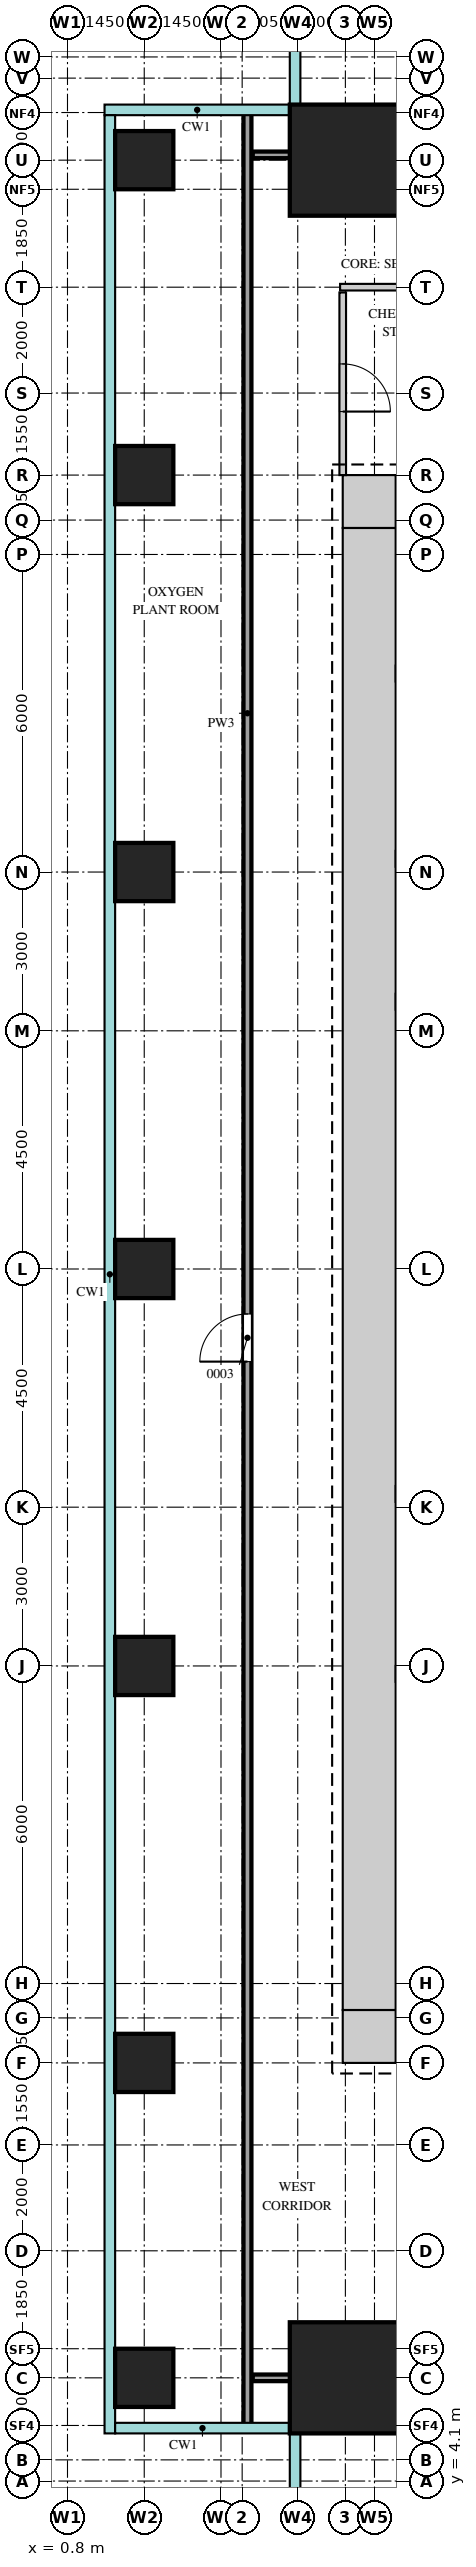
"""IFC4 building model, lengths in metres.
Left out: names, types, materials, properties, quantities, classifications, styles, units other than length and angle.
Written with IfcOpenShell. Run it as: python <this file> out.ifc"""

import sys

from ifc_helpers import new_model, si_unit, direction, frame, frame_2d, origin, origin_2d, place, context, subcontext, project, spatial, rectangle, extrude, source, transform, mapped, element, fill, save


model = new_model("IFC4")
c1 = context("Model", 3, precision=1e-05, world=origin(), true_north=direction((0.0, 1.0)))
c2 = subcontext(c1, "Body", "Model", "MODEL_VIEW")
j1 = project(units=[si_unit("LENGTHUNIT", "METRE"), si_unit("PLANEANGLEUNIT", "RADIAN")], contexts=[c1])
p1 = place(None, origin())
s1 = spatial("IfcSite", under=j1, at=p1, CompositionType="ELEMENT")
p2 = place(p1, origin())
s2 = spatial("IfcBuilding", under=s1, at=p2, CompositionType="ELEMENT")
p3 = place(p2, frame((0.0, 0.0, 145.5)))
s3 = spatial("IfcBuildingStorey", under=s2, at=p3, CompositionType="ELEMENT", Elevation=145.5)
m1 = source(origin(), c2, "Body", "SweptSolid", [
    extrude(rectangle(XDim=1.0, YDim=1.0, at=frame_2d((0.5, 0.0))), origin(), (0.0, 0.0, 1.0), 4.1),
])
for number, where, z_axis, x_axis in (
    (1, (6.0, 41.5, 0.0), (0.0, 0.0, 1.0), (1.0, 0.0, 0.0)),
    (2, (6.0, 12.5, 0.0), (0.0, 0.0, 1.0), (1.0, 0.0, 0.0)),
):
    element("IfcWall", number, at=place(p3, frame(where, z_axis=z_axis, x_axis=x_axis)), inside=s3, PredefinedType="SHEAR", context=c2, shape_type="MappedRepresentation", body=[
        mapped(m1, transform((0.0, 0.0, 0.0))),
    ])
m2 = source(origin(), c2, "Body", "SweptSolid", [
    extrude(rectangle(XDim=28.0, YDim=1.0, at=frame_2d((14.0, 0.0))), origin(), (0.0, 0.0, 1.0), 4.1),
])
p4 = place(p3, frame((6.5, 13.0, 0.0), z_axis=(0.0, 0.0, 1.0), x_axis=(0.0, 1.0, 0.0)))
e3 = element("IfcWall", 3, at=p4, inside=s3, PredefinedType="SHEAR", context=c2, shape_type="MappedRepresentation", body=[
    mapped(m2, transform((0.0, 0.0, 0.0))),
])
m3 = source(origin(), c2, "Body", "SweptSolid", [
    extrude(rectangle(XDim=2.1, YDim=2.1, at=origin_2d()), origin(), (0.0, 0.0, 1.0), 4.4),
])
for number, where, z_axis, x_axis in (
    (4, (6.05, 47.95, 0.0), (0.0, 0.0, 1.0), (1.0, 0.0, 0.0)),
    (5, (6.05, 6.05, 0.0), (0.0, 0.0, 1.0), (1.0, 0.0, 0.0)),
):
    element("IfcColumn", number, at=place(p3, frame(where, z_axis=z_axis, x_axis=x_axis)), inside=s3, PredefinedType="COLUMN", context=c2, shape_type="MappedRepresentation", body=[
        mapped(m3, transform((0.0, 0.0, 0.0))),
    ])
m4 = source(origin(), c2, "Body", "SweptSolid", [
    extrude(rectangle(XDim=1.1, YDim=1.1, at=origin_2d()), origin(), (0.0, 0.0, 1.0), 4.1),
])
for number, where, z_axis, x_axis in (
    (6, (2.25, 6.05, 0.0), (0.0, 0.0, 1.0), (1.0, 0.0, 0.0)),
    (7, (2.25, 12.0, 0.0), (0.0, 0.0, 1.0), (1.0, 0.0, 0.0)),
    (8, (2.25, 19.5, 0.0), (0.0, 0.0, 1.0), (1.0, 0.0, 0.0)),
    (9, (2.25, 27.0, 0.0), (0.0, 0.0, 1.0), (1.0, 0.0, 0.0)),
    (10, (2.25, 34.5, 0.0), (0.0, 0.0, 1.0), (1.0, 0.0, 0.0)),
    (11, (2.25, 42.0, 0.0), (0.0, 0.0, 1.0), (1.0, 0.0, 0.0)),
    (12, (2.25, 47.95, 0.0), (0.0, 0.0, 1.0), (1.0, 0.0, 0.0)),
):
    element("IfcColumn", number, at=place(p3, frame(where, z_axis=z_axis, x_axis=x_axis)), inside=s3, PredefinedType="COLUMN", context=c2, shape_type="MappedRepresentation", body=[
        mapped(m4, transform((0.0, 0.0, 0.0))),
    ])
m5 = source(origin(), c2, "Body", "SweptSolid", [
    extrude(rectangle(XDim=43.7, YDim=0.15, at=frame_2d((21.85, 0.0))), origin(), (0.0, 0.0, 1.0), 4.2),
])
p5 = place(p3, frame((4.2, 5.15, 0.0), z_axis=(0.0, 0.0, 1.0), x_axis=(0.0, 1.0, 0.0)))
e13 = element("IfcWall", 13, at=p5, inside=s3, PredefinedType="PARTITIONING", context=c2, shape_type="MappedRepresentation", body=[
    mapped(m5, transform((0.0, 0.0, 0.0))),
])
m6 = source(origin(), c2, "Body", "SweptSolid", [
    extrude(rectangle(XDim=0.9, YDim=2.1, at=frame_2d((0.45, 1.05))), frame((0.0, 0.085, 0.0), z_axis=(0.0, -1.0, 0.0), x_axis=(1.0, 0.0, 0.0)), (0.0, 0.0, 1.0), 0.17),
])
p6 = place(p5, frame((20.1, 0.0, 0.0)))
e14 = element("IfcOpeningElement", 14, at=p6, cuts=e13, PredefinedType="OPENING", context=c2, shape_type="MappedRepresentation", body=[
    mapped(m6, transform((0.0, 0.0, 0.0))),
])
m7 = source(origin(), c2, "Body", "SweptSolid", [
    extrude(rectangle(XDim=7.65, YDim=0.125, at=frame_2d((3.825, 0.0))), origin(), (0.0, 0.0, 1.0), 3.55),
])
p7 = place(p3, frame((4.3, 6.05, 0.0), z_axis=(0.0, 0.0, 1.0), x_axis=(1.0, 0.0, 0.0)))
e15 = element("IfcWall", 15, at=p7, inside=s3, PredefinedType="PARTITIONING", context=c2, shape_type="MappedRepresentation", body=[
    mapped(m7, transform((0.0, 0.0, 0.0))),
])
m8 = source(origin(), c2, "Body", "SweptSolid", [
    extrude(rectangle(XDim=0.9, YDim=2.1, at=frame_2d((0.45, 1.05))), frame((0.0, 0.073, 0.0), z_axis=(0.0, -1.0, 0.0), x_axis=(1.0, 0.0, 0.0)), (0.0, 0.0, 1.0), 0.145),
])
p8 = place(p7, frame((3.35, 0.0, 0.0)))
e16 = element("IfcOpeningElement", 16, at=p8, cuts=e15, PredefinedType="OPENING", context=c2, shape_type="MappedRepresentation", body=[
    mapped(m8, transform((0.0, 0.0, 0.0))),
])
m9 = source(origin(), c2, "Body", "SweptSolid", [
    extrude(rectangle(XDim=3.45, YDim=0.125, at=frame_2d((1.725, 0.0))), origin(), (0.0, 0.0, 1.0), 4.2),
])
p9 = place(p3, frame((6.0, 42.0, 0.0), z_axis=(0.0, 0.0, 1.0), x_axis=(0.0, 1.0, 0.0)))
e17 = element("IfcWall", 17, at=p9, inside=s3, PredefinedType="PARTITIONING", context=c2, shape_type="MappedRepresentation", body=[
    mapped(m9, transform((0.0, 0.0, 0.0))),
])
p10 = place(p9, frame((1.2, 0.0, 0.0)))
e18 = element("IfcOpeningElement", 18, at=p10, cuts=e17, PredefinedType="OPENING", context=c2, shape_type="MappedRepresentation", body=[
    mapped(m8, transform((0.0, 0.0, 0.0))),
])
m10 = source(origin(), c2, "Body", "SweptSolid", [
    extrude(rectangle(XDim=7.95, YDim=0.125, at=frame_2d((3.975, 0.0))), origin(), (0.0, 0.0, 1.0), 4.2),
])
p11 = place(p3, frame((5.95, 45.55, 0.0), z_axis=(0.0, 0.0, 1.0), x_axis=(1.0, 0.0, 0.0)))
e19 = element("IfcWall", 19, at=p11, inside=s3, PredefinedType="PARTITIONING", context=c2, shape_type="MappedRepresentation", body=[
    mapped(m10, transform((0.0, 0.0, 0.0))),
])
p12 = place(p11, frame((3.3, 0.0, 0.0)))
e20 = element("IfcOpeningElement", 20, at=p12, cuts=e19, PredefinedType="OPENING", context=c2, shape_type="MappedRepresentation", body=[
    mapped(m8, transform((0.0, 0.0, 0.0))),
])
p13 = place(p11, frame((6.1, 0.0, 0.0)))
e21 = element("IfcOpeningElement", 21, at=p13, cuts=e19, PredefinedType="OPENING", context=c2, shape_type="MappedRepresentation", body=[
    mapped(m8, transform((0.0, 0.0, 0.0))),
])
m11 = source(origin(), c2, "Body", "SweptSolid", [
    extrude(rectangle(XDim=42.05, YDim=0.125, at=frame_2d((21.025, 0.0))), origin(), (0.0, 0.0, 1.0), 3.55),
])
p14 = place(p3, frame((4.3, 48.05, 0.0), z_axis=(0.0, 0.0, 1.0), x_axis=(1.0, 0.0, 0.0)))
e22 = element("IfcWall", 22, at=p14, inside=s3, PredefinedType="PARTITIONING", context=c2, shape_type="MappedRepresentation", body=[
    mapped(m11, transform((0.0, 0.0, 0.0))),
])
p15 = place(p14, frame((7.1, 0.0, 0.0)))
e23 = element("IfcOpeningElement", 23, at=p15, cuts=e22, PredefinedType="OPENING", context=c2, shape_type="MappedRepresentation", body=[
    mapped(m8, transform((0.0, 0.0, 0.0))),
])
m12 = source(origin(), c2, "Body", "SweptSolid", [
    extrude(rectangle(XDim=1.2, YDim=2.1, at=frame_2d((0.6, 1.05))), frame((0.0, 0.073, 0.0), z_axis=(0.0, -1.0, 0.0), x_axis=(1.0, 0.0, 0.0)), (0.0, 0.0, 1.0), 0.145),
])
p16 = place(p14, frame((28.2, 0.0, 0.0)))
e24 = element("IfcOpeningElement", 24, at=p16, cuts=e22, PredefinedType="OPENING", context=c2, shape_type="MappedRepresentation", body=[
    mapped(m12, transform((0.0, 0.0, 0.0))),
])
m13 = source(origin(), c2, "Body", "SweptSolid", [
    extrude(rectangle(XDim=0.9, YDim=2.1, at=frame_2d((0.45, 1.05))), frame((0.0, 0.025, 0.0), z_axis=(0.0, -1.0, 0.0), x_axis=(1.0, 0.0, 0.0)), (0.0, 0.0, 1.0), 0.05),
])
p17 = place(p6, origin())
e25 = element("IfcDoor", 25, at=p17, inside=s3, OperationType="SINGLE_SWING_RIGHT", PredefinedType="DOOR", context=c2, shape_type="MappedRepresentation", body=[
    mapped(m13, transform((0.0, 0.0, 0.0))),
])
fill(e14, e25)
p18 = place(p10, origin())
e26 = element("IfcDoor", 26, at=p18, inside=s3, OperationType="SINGLE_SWING_LEFT", PredefinedType="DOOR", context=c2, shape_type="MappedRepresentation", body=[
    mapped(m13, transform((0.0, 0.0, 0.0))),
])
fill(e18, e26)
save(model, sys.argv[1])
